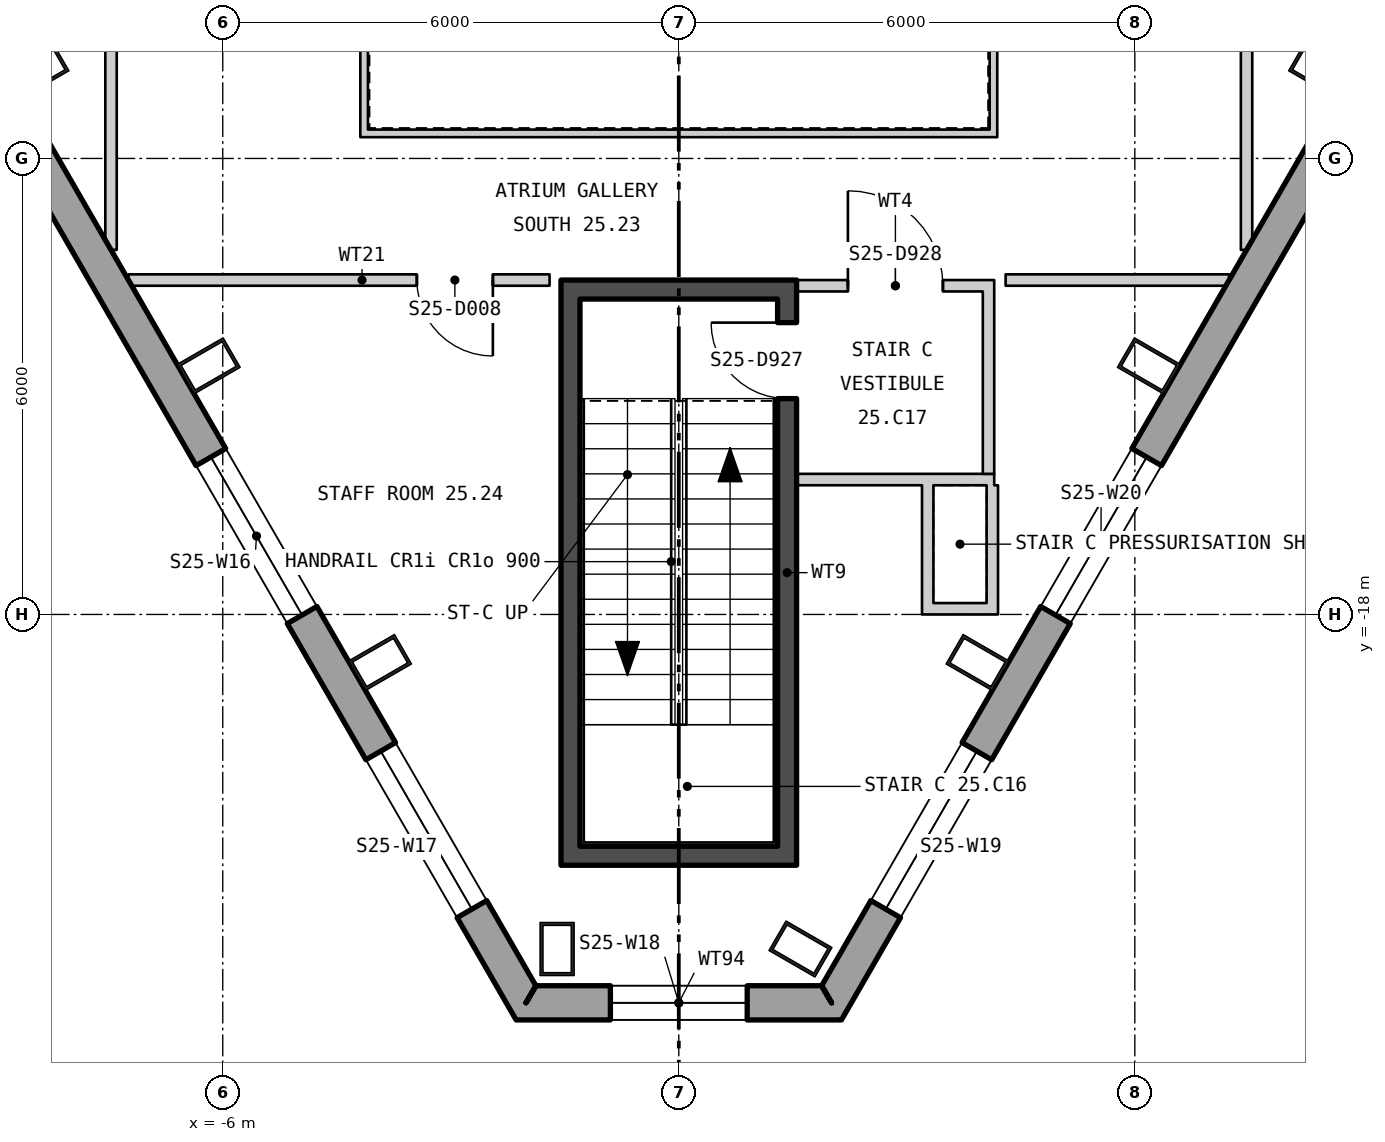
"""IFC4 building model, lengths in metres.
Left out: names, types, materials, properties, quantities, classifications, styles, units other than length and angle.
Written with IfcOpenShell. Run it as: python <this file> out.ifc"""

import sys

from ifc_helpers import new_model, si_unit, direction, frame, frame_2d, origin, origin_2d, place, context, subcontext, project, spatial, polyline, rectangle, hollow_rectangle, outline, extrude, element, fill, save


model = new_model("IFC4")
c1 = context("Model", 3, precision=1e-05, world=origin(), true_north=direction((0.0, 1.0)))
c2 = subcontext(c1, "Body", "Model", "MODEL_VIEW")
j1 = project(units=[si_unit("LENGTHUNIT", "METRE"), si_unit("PLANEANGLEUNIT", "RADIAN")], contexts=[c1])
p1 = place(None, origin())
s1 = spatial("IfcSite", under=j1, at=p1, CompositionType="ELEMENT")
p2 = place(p1, origin())
s2 = spatial("IfcBuilding", under=s1, at=p2, CompositionType="ELEMENT")
p3 = place(p2, frame((0.0, 0.0, 321.0)))
s3 = spatial("IfcBuildingStorey", under=s2, at=p3, CompositionType="ELEMENT", Elevation=321.0)
for number, where, z_axis, x_axis in (
    (1, (-8.438, -10.827, 0.0), (0.0, 0.0, 1.0), (0.5, -0.866, 0.0)),
    (2, (-6.185, -14.729, 0.0), (0.0, 0.0, 1.0), (0.5, -0.866, 0.0)),
    (3, (-3.931, -18.632, 0.0), (0.0, 0.0, 1.0), (0.5, -0.866, 0.0)),
    (4, (-1.601, -22.402, 0.0), (0.0, 0.0, 1.0), (1.0, 0.0, 0.0)),
    (5, (1.601, -22.402, 0.0), (0.0, 0.0, 1.0), (0.5, 0.866, 0.0)),
    (6, (3.931, -18.632, 0.0), (0.0, 0.0, 1.0), (0.5, 0.866, 0.0)),
    (7, (6.185, -14.729, 0.0), (0.0, 0.0, 1.0), (0.5, 0.866, 0.0)),
    (8, (8.438, -10.827, 0.0), (0.0, 0.0, 1.0), (0.5, 0.866, 0.0)),
):
    element("IfcColumn", number, at=place(p3, frame(where, z_axis=z_axis, x_axis=x_axis)), inside=s3, PredefinedType="COLUMN", context=c2, shape_type="SweptSolid", body=[
        extrude(hollow_rectangle(XDim=0.45, YDim=0.7, WallThickness=0.04, at=origin_2d()), origin(), (0.0, 0.0, 1.0), 4.2),
    ])
p4 = place(p3, frame((-24.875, 16.493, -0.18), z_axis=(0.0, 0.0, 1.0), x_axis=(0.500000141277, -0.866025322218, 0.0)))
e9 = element("IfcWall", 9, at=p4, inside=s3, PredefinedType="SOLIDWALL", context=c2, shape_type="SweptSolid", body=[
    extrude(outline(polyline([(-0.13, -0.225), (45.86, -0.225), (45.6, 0.225), (0.13, 0.225), (-0.13, -0.225)])), origin(), (0.0, 0.0, 1.0), 3.98),
])
p5 = place(p4, frame((1.424, 0.0, 1.08)))
e10 = element("IfcOpeningElement", 10, at=p5, cuts=e9, PredefinedType="OPENING", context=c2, shape_type="SweptSolid", body=[
    extrude(rectangle(XDim=2.4, YDim=2.3, at=frame_2d((1.2, 1.15))), frame((0.0, 0.235, 0.0), z_axis=(0.0, -1.0, 0.0), x_axis=(1.0, 0.0, 0.0)), (0.0, 0.0, 1.0), 0.47),
])
p6 = place(p4, frame((5.892, 0.0, 1.08)))
e11 = element("IfcOpeningElement", 11, at=p6, cuts=e9, PredefinedType="OPENING", context=c2, shape_type="SweptSolid", body=[
    extrude(rectangle(XDim=2.4, YDim=2.3, at=frame_2d((1.2, 1.15))), frame((0.0, 0.235, 0.0), z_axis=(0.0, -1.0, 0.0), x_axis=(1.0, 0.0, 0.0)), (0.0, 0.0, 1.0), 0.47),
])
p7 = place(p4, frame((10.399, 0.0, 1.08)))
e12 = element("IfcOpeningElement", 12, at=p7, cuts=e9, PredefinedType="OPENING", context=c2, shape_type="SweptSolid", body=[
    extrude(rectangle(XDim=2.4, YDim=2.3, at=frame_2d((1.2, 1.15))), frame((0.0, 0.235, 0.0), z_axis=(0.0, -1.0, 0.0), x_axis=(1.0, 0.0, 0.0)), (0.0, 0.0, 1.0), 0.47),
])
p8 = place(p4, frame((14.905, 0.0, 1.08)))
e13 = element("IfcOpeningElement", 13, at=p8, cuts=e9, PredefinedType="OPENING", context=c2, shape_type="SweptSolid", body=[
    extrude(rectangle(XDim=2.4, YDim=2.3, at=frame_2d((1.2, 1.15))), frame((0.0, 0.235, 0.0), z_axis=(0.0, -1.0, 0.0), x_axis=(1.0, 0.0, 0.0)), (0.0, 0.0, 1.0), 0.47),
])
p9 = place(p4, frame((19.412, 0.0, 1.08)))
e14 = element("IfcOpeningElement", 14, at=p9, cuts=e9, PredefinedType="OPENING", context=c2, shape_type="SweptSolid", body=[
    extrude(rectangle(XDim=2.4, YDim=2.3, at=frame_2d((1.2, 1.15))), frame((0.0, 0.235, 0.0), z_axis=(0.0, -1.0, 0.0), x_axis=(1.0, 0.0, 0.0)), (0.0, 0.0, 1.0), 0.47),
])
p10 = place(p4, frame((23.918, 0.0, 1.08)))
e15 = element("IfcOpeningElement", 15, at=p10, cuts=e9, PredefinedType="OPENING", context=c2, shape_type="SweptSolid", body=[
    extrude(rectangle(XDim=2.4, YDim=2.3, at=frame_2d((1.2, 1.15))), frame((0.0, 0.235, 0.0), z_axis=(0.0, -1.0, 0.0), x_axis=(1.0, 0.0, 0.0)), (0.0, 0.0, 1.0), 0.47),
])
p11 = place(p4, frame((28.425, 0.0, 1.08)))
e16 = element("IfcOpeningElement", 16, at=p11, cuts=e9, PredefinedType="OPENING", context=c2, shape_type="SweptSolid", body=[
    extrude(rectangle(XDim=2.4, YDim=2.3, at=frame_2d((1.2, 1.15))), frame((0.0, 0.235, 0.0), z_axis=(0.0, -1.0, 0.0), x_axis=(1.0, 0.0, 0.0)), (0.0, 0.0, 1.0), 0.47),
])
p12 = place(p4, frame((37.438, 0.0, 1.08)))
e17 = element("IfcOpeningElement", 17, at=p12, cuts=e9, PredefinedType="OPENING", context=c2, shape_type="SweptSolid", body=[
    extrude(rectangle(XDim=2.4, YDim=2.3, at=frame_2d((1.2, 1.15))), frame((0.0, 0.235, 0.0), z_axis=(0.0, -1.0, 0.0), x_axis=(1.0, 0.0, 0.0)), (0.0, 0.0, 1.0), 0.47),
])
p13 = place(p4, frame((41.907, 0.0, 1.08)))
e18 = element("IfcOpeningElement", 18, at=p13, cuts=e9, PredefinedType="OPENING", context=c2, shape_type="SweptSolid", body=[
    extrude(rectangle(XDim=2.4, YDim=2.3, at=frame_2d((1.2, 1.15))), frame((0.0, 0.235, 0.0), z_axis=(0.0, -1.0, 0.0), x_axis=(1.0, 0.0, 0.0)), (0.0, 0.0, 1.0), 0.47),
])
p14 = place(p3, frame((-2.01, -23.11, -0.18), z_axis=(0.0, 0.0, 1.0), x_axis=(1.0, 0.0, 0.0)))
e19 = element("IfcWall", 19, at=p14, inside=s3, PredefinedType="SOLIDWALL", context=c2, shape_type="SweptSolid", body=[
    extrude(outline(polyline([(-0.13, -0.225), (4.15, -0.225), (3.89, 0.225), (0.13, 0.225), (-0.13, -0.225)])), origin(), (0.0, 0.0, 1.0), 3.98),
])
p15 = place(p14, frame((1.11, 0.0, 1.08)))
e20 = element("IfcOpeningElement", 20, at=p15, cuts=e19, PredefinedType="OPENING", context=c2, shape_type="SweptSolid", body=[
    extrude(rectangle(XDim=1.8, YDim=2.3, at=frame_2d((0.9, 1.15))), frame((0.0, 0.235, 0.0), z_axis=(0.0, -1.0, 0.0), x_axis=(1.0, 0.0, 0.0)), (0.0, 0.0, 1.0), 0.47),
])
p16 = place(p3, frame((2.01, -23.11, -0.18), z_axis=(0.0, 0.0, 1.0), x_axis=(0.500000141277, 0.866025322218, 0.0)))
e21 = element("IfcWall", 21, at=p16, inside=s3, PredefinedType="SOLIDWALL", context=c2, shape_type="SweptSolid", body=[
    extrude(outline(polyline([(-0.13, -0.225), (45.86, -0.225), (45.6, 0.225), (0.13, 0.225), (-0.13, -0.225)])), origin(), (0.0, 0.0, 1.0), 3.98),
])
p17 = place(p16, frame((1.424, 0.0, 1.08)))
e22 = element("IfcOpeningElement", 22, at=p17, cuts=e21, PredefinedType="OPENING", context=c2, shape_type="SweptSolid", body=[
    extrude(rectangle(XDim=2.4, YDim=2.3, at=frame_2d((1.2, 1.15))), frame((0.0, 0.235, 0.0), z_axis=(0.0, -1.0, 0.0), x_axis=(1.0, 0.0, 0.0)), (0.0, 0.0, 1.0), 0.47),
])
p18 = place(p16, frame((5.892, 0.0, 1.08)))
e23 = element("IfcOpeningElement", 23, at=p18, cuts=e21, PredefinedType="OPENING", context=c2, shape_type="SweptSolid", body=[
    extrude(rectangle(XDim=2.4, YDim=2.3, at=frame_2d((1.2, 1.15))), frame((0.0, 0.235, 0.0), z_axis=(0.0, -1.0, 0.0), x_axis=(1.0, 0.0, 0.0)), (0.0, 0.0, 1.0), 0.47),
])
p19 = place(p16, frame((14.905, 0.0, 1.08)))
e24 = element("IfcOpeningElement", 24, at=p19, cuts=e21, PredefinedType="OPENING", context=c2, shape_type="SweptSolid", body=[
    extrude(rectangle(XDim=2.4, YDim=2.3, at=frame_2d((1.2, 1.15))), frame((0.0, 0.235, 0.0), z_axis=(0.0, -1.0, 0.0), x_axis=(1.0, 0.0, 0.0)), (0.0, 0.0, 1.0), 0.47),
])
p20 = place(p16, frame((19.412, 0.0, 1.08)))
e25 = element("IfcOpeningElement", 25, at=p20, cuts=e21, PredefinedType="OPENING", context=c2, shape_type="SweptSolid", body=[
    extrude(rectangle(XDim=2.4, YDim=2.3, at=frame_2d((1.2, 1.15))), frame((0.0, 0.235, 0.0), z_axis=(0.0, -1.0, 0.0), x_axis=(1.0, 0.0, 0.0)), (0.0, 0.0, 1.0), 0.47),
])
p21 = place(p16, frame((23.918, 0.0, 1.08)))
e26 = element("IfcOpeningElement", 26, at=p21, cuts=e21, PredefinedType="OPENING", context=c2, shape_type="SweptSolid", body=[
    extrude(rectangle(XDim=2.4, YDim=2.3, at=frame_2d((1.2, 1.15))), frame((0.0, 0.235, 0.0), z_axis=(0.0, -1.0, 0.0), x_axis=(1.0, 0.0, 0.0)), (0.0, 0.0, 1.0), 0.47),
])
p22 = place(p16, frame((28.425, 0.0, 1.08)))
e27 = element("IfcOpeningElement", 27, at=p22, cuts=e21, PredefinedType="OPENING", context=c2, shape_type="SweptSolid", body=[
    extrude(rectangle(XDim=2.4, YDim=2.3, at=frame_2d((1.2, 1.15))), frame((0.0, 0.235, 0.0), z_axis=(0.0, -1.0, 0.0), x_axis=(1.0, 0.0, 0.0)), (0.0, 0.0, 1.0), 0.47),
])
p23 = place(p16, frame((37.438, 0.0, 1.08)))
e28 = element("IfcOpeningElement", 28, at=p23, cuts=e21, PredefinedType="OPENING", context=c2, shape_type="SweptSolid", body=[
    extrude(rectangle(XDim=2.4, YDim=2.3, at=frame_2d((1.2, 1.15))), frame((0.0, 0.235, 0.0), z_axis=(0.0, -1.0, 0.0), x_axis=(1.0, 0.0, 0.0)), (0.0, 0.0, 1.0), 0.47),
])
p24 = place(p16, frame((41.907, 0.0, 1.08)))
e29 = element("IfcOpeningElement", 29, at=p24, cuts=e21, PredefinedType="OPENING", context=c2, shape_type="SweptSolid", body=[
    extrude(rectangle(XDim=2.4, YDim=2.3, at=frame_2d((1.2, 1.15))), frame((0.0, 0.235, 0.0), z_axis=(0.0, -1.0, 0.0), x_axis=(1.0, 0.0, 0.0)), (0.0, 0.0, 1.0), 0.47),
])
p25 = place(p3, frame((-4.19, -11.67, 0.0), z_axis=(0.0, 0.0, 1.0), x_axis=(1.0, 0.0, 0.0)))
e30 = element("IfcWall", 30, at=p25, inside=s3, PredefinedType="PARTITIONING", context=c2, shape_type="SweptSolid", body=[
    extrude(rectangle(XDim=8.38, YDim=0.1, at=frame_2d((4.19, 0.0))), origin(), (0.0, 0.0, 1.0), 4.0),
])
for number, where, z_axis, x_axis in (
    (31, (4.14, -11.62, 0.0), (0.0, 0.0, 1.0), (0.0, 1.0, 0.0)),
    (32, (-4.14, -3.58, 0.0), (0.0, 0.0, 1.0), (0.0, -1.0, 0.0)),
):
    element("IfcWall", number, at=place(p3, frame(where, z_axis=z_axis, x_axis=x_axis)), inside=s3, PredefinedType="PARTITIONING", context=c2, shape_type="SweptSolid", body=[
        extrude(rectangle(XDim=8.04, YDim=0.1, at=frame_2d((4.02, 0.0))), origin(), (0.0, 0.0, 1.0), 4.0),
    ])
p26 = place(p3, frame((-1.425, -21.05, 0.0), z_axis=(0.0, 0.0, 1.0), x_axis=(0.0, 1.0, 0.0)))
e33 = element("IfcWall", 33, at=p26, inside=s3, PredefinedType="SHEAR", context=c2, shape_type="SweptSolid", body=[
    extrude(rectangle(XDim=7.2, YDim=0.25, at=frame_2d((3.6, 0.0))), origin(), (0.0, 0.0, 1.0), 4.0),
])
p27 = place(p3, frame((1.425, -21.05, 0.0), z_axis=(0.0, 0.0, 1.0), x_axis=(0.0, 1.0, 0.0)))
e34 = element("IfcWall", 34, at=p27, inside=s3, PredefinedType="SHEAR", context=c2, shape_type="SweptSolid", body=[
    extrude(rectangle(XDim=7.2, YDim=0.25, at=frame_2d((3.6, 0.0))), origin(), (0.0, 0.0, 1.0), 4.0),
])
p28 = place(p27, frame((5.89, 0.0, 0.0)))
e35 = element("IfcOpeningElement", 35, at=p28, cuts=e34, PredefinedType="OPENING", context=c2, shape_type="SweptSolid", body=[
    extrude(rectangle(XDim=1.0, YDim=2.1, at=frame_2d((0.5, 1.05))), frame((0.0, 0.135, 0.0), z_axis=(0.0, -1.0, 0.0), x_axis=(1.0, 0.0, 0.0)), (0.0, 0.0, 1.0), 0.27),
])
for number, where, z_axis, x_axis in (
    (36, (-1.55, -21.175, 0.0), (0.0, 0.0, 1.0), (1.0, 0.0, 0.0)),
    (37, (-1.55, -13.725, 0.0), (0.0, 0.0, 1.0), (1.0, 0.0, 0.0)),
):
    element("IfcWall", number, at=place(p3, frame(where, z_axis=z_axis, x_axis=x_axis)), inside=s3, PredefinedType="SHEAR", context=c2, shape_type="SweptSolid", body=[
        extrude(rectangle(XDim=3.1, YDim=0.25, at=frame_2d((1.55, 0.0))), origin(), (0.0, 0.0, 1.0), 4.0),
    ])
p29 = place(p3, frame((1.55, -16.225, 0.0), z_axis=(0.0, 0.0, 1.0), x_axis=(1.0, 0.0, 0.0)))
e38 = element("IfcWall", 38, at=p29, inside=s3, PredefinedType="PARTITIONING", context=c2, shape_type="SweptSolid", body=[
    extrude(rectangle(XDim=2.6, YDim=0.15, at=frame_2d((1.3, 0.0))), origin(), (0.0, 0.0, 1.0), 4.0),
])
p30 = place(p3, frame((4.075, -16.15, 0.0), z_axis=(0.0, 0.0, 1.0), x_axis=(0.0, 1.0, 0.0)))
e39 = element("IfcWall", 39, at=p30, inside=s3, PredefinedType="PARTITIONING", context=c2, shape_type="SweptSolid", body=[
    extrude(rectangle(XDim=2.4, YDim=0.15, at=frame_2d((1.2, 0.0))), origin(), (0.0, 0.0, 1.0), 4.0),
])
p31 = place(p3, frame((1.55, -13.675, 0.0), z_axis=(0.0, 0.0, 1.0), x_axis=(1.0, 0.0, 0.0)))
e40 = element("IfcWall", 40, at=p31, inside=s3, PredefinedType="PARTITIONING", context=c2, shape_type="SweptSolid", body=[
    extrude(rectangle(XDim=2.6, YDim=0.15, at=frame_2d((1.3, 0.0))), origin(), (0.0, 0.0, 1.0), 3.21),
])
p32 = place(p31, frame((0.675, 0.0, 0.0)))
e41 = element("IfcOpeningElement", 41, at=p32, cuts=e40, PredefinedType="OPENING", context=c2, shape_type="SweptSolid", body=[
    extrude(rectangle(XDim=1.25, YDim=2.1, at=frame_2d((0.625, 1.05))), frame((0.0, 0.085, 0.0), z_axis=(0.0, -1.0, 0.0), x_axis=(1.0, 0.0, 0.0)), (0.0, 0.0, 1.0), 0.17),
])
p33 = place(p3, frame((3.275, -18.0, 0.0), z_axis=(0.0, 0.0, 1.0), x_axis=(0.0, 1.0, 0.0)))
e42 = element("IfcWall", 42, at=p33, inside=s3, PredefinedType="PARTITIONING", context=c2, shape_type="SweptSolid", body=[
    extrude(rectangle(XDim=1.7, YDim=0.15, at=frame_2d((0.85, 0.0))), origin(), (0.0, 0.0, 1.0), 3.55),
])
p34 = place(p3, frame((3.35, -17.925, 0.0), z_axis=(0.0, 0.0, 1.0), x_axis=(1.0, 0.0, 0.0)))
e43 = element("IfcWall", 43, at=p34, inside=s3, PredefinedType="PARTITIONING", context=c2, shape_type="SweptSolid", body=[
    extrude(rectangle(XDim=0.7, YDim=0.15, at=frame_2d((0.35, 0.0))), origin(), (0.0, 0.0, 1.0), 4.0),
])
p35 = place(p3, frame((4.125, -18.0, 0.0), z_axis=(0.0, 0.0, 1.0), x_axis=(0.0, 1.0, 0.0)))
e44 = element("IfcWall", 44, at=p35, inside=s3, PredefinedType="PARTITIONING", context=c2, shape_type="SweptSolid", body=[
    extrude(rectangle(XDim=1.7, YDim=0.15, at=frame_2d((0.85, 0.0))), origin(), (0.0, 0.0, 1.0), 4.0),
])
p36 = place(p3, frame((-7.47, -13.203, 0.0), z_axis=(0.0, 0.0, 1.0), x_axis=(0.0, 1.0, 0.0)))
e45 = element("IfcWall", 45, at=p36, inside=s3, PredefinedType="PARTITIONING", context=c2, shape_type="SweptSolid", body=[
    extrude(rectangle(XDim=17.203, YDim=0.15, at=frame_2d((8.601, 0.0))), origin(), (0.0, 0.0, 1.0), 4.0),
])
p37 = place(p36, frame((3.519, 0.0, 0.0)))
e46 = element("IfcOpeningElement", 46, at=p37, cuts=e45, PredefinedType="OPENING", context=c2, shape_type="SweptSolid", body=[
    extrude(rectangle(XDim=1.0, YDim=2.1, at=frame_2d((0.5, 1.05))), frame((0.0, 0.085, 0.0), z_axis=(0.0, -1.0, 0.0), x_axis=(1.0, 0.0, 0.0)), (0.0, 0.0, 1.0), 0.17),
])
p38 = place(p36, frame((15.803, 0.0, 0.0)))
e47 = element("IfcOpeningElement", 47, at=p38, cuts=e45, PredefinedType="OPENING", context=c2, shape_type="SweptSolid", body=[
    extrude(rectangle(XDim=1.0, YDim=2.1, at=frame_2d((0.5, 1.05))), frame((0.0, 0.085, 0.0), z_axis=(0.0, -1.0, 0.0), x_axis=(1.0, 0.0, 0.0)), (0.0, 0.0, 1.0), 0.17),
])
p39 = place(p3, frame((-7.241, -13.6, 0.0), z_axis=(0.0, 0.0, 1.0), x_axis=(1.0, 0.0, 0.0)))
e48 = element("IfcWall", 48, at=p39, inside=s3, PredefinedType="PARTITIONING", context=c2, shape_type="SweptSolid", body=[
    extrude(rectangle(XDim=0.606, YDim=0.15, at=frame_2d((0.303, 0.0))), origin(), (0.0, 0.0, 1.0), 4.0),
])
p40 = place(p3, frame((-6.635, -13.6, 0.0), z_axis=(0.0, 0.0, 1.0), x_axis=(1.0, 0.0, 0.0)))
e49 = element("IfcWall", 49, at=p40, inside=s3, PredefinedType="PARTITIONING", context=c2, shape_type="SweptSolid", body=[
    extrude(rectangle(XDim=4.935, YDim=0.15, at=frame_2d((2.467, 0.0))), origin(), (0.0, 0.0, 1.0), 3.21),
])
p41 = place(p40, frame((3.189, 0.0, 0.0)))
e50 = element("IfcOpeningElement", 50, at=p41, cuts=e49, PredefinedType="OPENING", context=c2, shape_type="SweptSolid", body=[
    extrude(rectangle(XDim=1.0, YDim=2.1, at=frame_2d((0.5, 1.05))), frame((0.0, 0.085, 0.0), z_axis=(0.0, -1.0, 0.0), x_axis=(1.0, 0.0, 0.0)), (0.0, 0.0, 1.0), 0.17),
])
p42 = place(p3, frame((4.3, -13.6, 0.0), z_axis=(0.0, 0.0, 1.0), x_axis=(1.0, 0.0, 0.0)))
e51 = element("IfcWall", 51, at=p42, inside=s3, PredefinedType="PARTITIONING", context=c2, shape_type="SweptSolid", body=[
    extrude(rectangle(XDim=2.335, YDim=0.15, at=frame_2d((1.167, 0.0))), origin(), (0.0, 0.0, 1.0), 3.21),
])
p43 = place(p3, frame((6.635, -13.6, 0.0), z_axis=(0.0, 0.0, 1.0), x_axis=(1.0, 0.0, 0.0)))
e52 = element("IfcWall", 52, at=p43, inside=s3, PredefinedType="PARTITIONING", context=c2, shape_type="SweptSolid", body=[
    extrude(rectangle(XDim=0.606, YDim=0.15, at=frame_2d((0.303, 0.0))), origin(), (0.0, 0.0, 1.0), 4.0),
])
p44 = place(p3, frame((7.47, -13.203, 0.0), z_axis=(0.0, 0.0, 1.0), x_axis=(0.0, 1.0, 0.0)))
e53 = element("IfcWall", 53, at=p44, inside=s3, PredefinedType="PARTITIONING", context=c2, shape_type="SweptSolid", body=[
    extrude(rectangle(XDim=8.15, YDim=0.15, at=frame_2d((4.075, 0.0))), origin(), (0.0, 0.0, 1.0), 4.0),
])
p45 = place(p44, frame((3.519, 0.0, 0.0)))
e54 = element("IfcOpeningElement", 54, at=p45, cuts=e53, PredefinedType="OPENING", context=c2, shape_type="SweptSolid", body=[
    extrude(rectangle(XDim=1.0, YDim=2.1, at=frame_2d((0.5, 1.05))), frame((0.0, 0.085, 0.0), z_axis=(0.0, -1.0, 0.0), x_axis=(1.0, 0.0, 0.0)), (0.0, 0.0, 1.0), 0.17),
])
p46 = place(p12, origin())
e55 = element("IfcWindow", 55, at=p46, inside=s3, PartitioningType="SINGLE_PANEL", PredefinedType="WINDOW", context=c2, shape_type="SweptSolid", body=[
    extrude(rectangle(XDim=2.4, YDim=2.3, at=frame_2d((1.2, 1.15))), frame((0.0, 0.105, 0.0), z_axis=(0.0, -1.0, 0.0), x_axis=(1.0, 0.0, 0.0)), (0.0, 0.0, 1.0), 0.06),
])
fill(e17, e55)
p47 = place(p13, origin())
e56 = element("IfcWindow", 56, at=p47, inside=s3, PartitioningType="SINGLE_PANEL", PredefinedType="WINDOW", context=c2, shape_type="SweptSolid", body=[
    extrude(rectangle(XDim=2.4, YDim=2.3, at=frame_2d((1.2, 1.15))), frame((0.0, 0.105, 0.0), z_axis=(0.0, -1.0, 0.0), x_axis=(1.0, 0.0, 0.0)), (0.0, 0.0, 1.0), 0.06),
])
fill(e18, e56)
p48 = place(p15, origin())
e57 = element("IfcWindow", 57, at=p48, inside=s3, PartitioningType="SINGLE_PANEL", PredefinedType="WINDOW", context=c2, shape_type="SweptSolid", body=[
    extrude(rectangle(XDim=1.8, YDim=2.3, at=frame_2d((0.9, 1.15))), frame((0.0, 0.105, 0.0), z_axis=(0.0, -1.0, 0.0), x_axis=(1.0, 0.0, 0.0)), (0.0, 0.0, 1.0), 0.06),
])
fill(e20, e57)
p49 = place(p17, origin())
e58 = element("IfcWindow", 58, at=p49, inside=s3, PartitioningType="SINGLE_PANEL", PredefinedType="WINDOW", context=c2, shape_type="SweptSolid", body=[
    extrude(rectangle(XDim=2.4, YDim=2.3, at=frame_2d((1.2, 1.15))), frame((0.0, 0.105, 0.0), z_axis=(0.0, -1.0, 0.0), x_axis=(1.0, 0.0, 0.0)), (0.0, 0.0, 1.0), 0.06),
])
fill(e22, e58)
p50 = place(p18, origin())
e59 = element("IfcWindow", 59, at=p50, inside=s3, PartitioningType="SINGLE_PANEL", PredefinedType="WINDOW", context=c2, shape_type="SweptSolid", body=[
    extrude(rectangle(XDim=2.4, YDim=2.3, at=frame_2d((1.2, 1.15))), frame((0.0, 0.105, 0.0), z_axis=(0.0, -1.0, 0.0), x_axis=(1.0, 0.0, 0.0)), (0.0, 0.0, 1.0), 0.06),
])
fill(e23, e59)
p51 = place(p28, origin())
e60 = element("IfcDoor", 60, at=p51, inside=s3, OperationType="SINGLE_SWING_LEFT", PredefinedType="DOOR", context=c2, shape_type="SweptSolid", body=[
    extrude(rectangle(XDim=1.0, YDim=2.1, at=frame_2d((0.5, 1.05))), frame((0.0, 0.025, 0.0), z_axis=(0.0, -1.0, 0.0), x_axis=(1.0, 0.0, 0.0)), (0.0, 0.0, 1.0), 0.05),
])
fill(e35, e60)
p52 = place(p32, origin())
e61 = element("IfcDoor", 61, at=p52, inside=s3, OperationType="SINGLE_SWING_RIGHT", PredefinedType="DOOR", context=c2, shape_type="SweptSolid", body=[
    extrude(rectangle(XDim=1.25, YDim=2.1, at=frame_2d((0.625, 1.05))), frame((0.0, 0.025, 0.0), z_axis=(0.0, -1.0, 0.0), x_axis=(1.0, 0.0, 0.0)), (0.0, 0.0, 1.0), 0.05),
])
fill(e41, e61)
p53 = place(p41, origin())
e62 = element("IfcDoor", 62, at=p53, inside=s3, OperationType="SINGLE_SWING_RIGHT", PredefinedType="DOOR", context=c2, shape_type="SweptSolid", body=[
    extrude(rectangle(XDim=1.0, YDim=2.1, at=frame_2d((0.5, 1.05))), frame((0.0, 0.025, 0.0), z_axis=(0.0, -1.0, 0.0), x_axis=(1.0, 0.0, 0.0)), (0.0, 0.0, 1.0), 0.05),
])
fill(e50, e62)
save(model, sys.argv[1])
